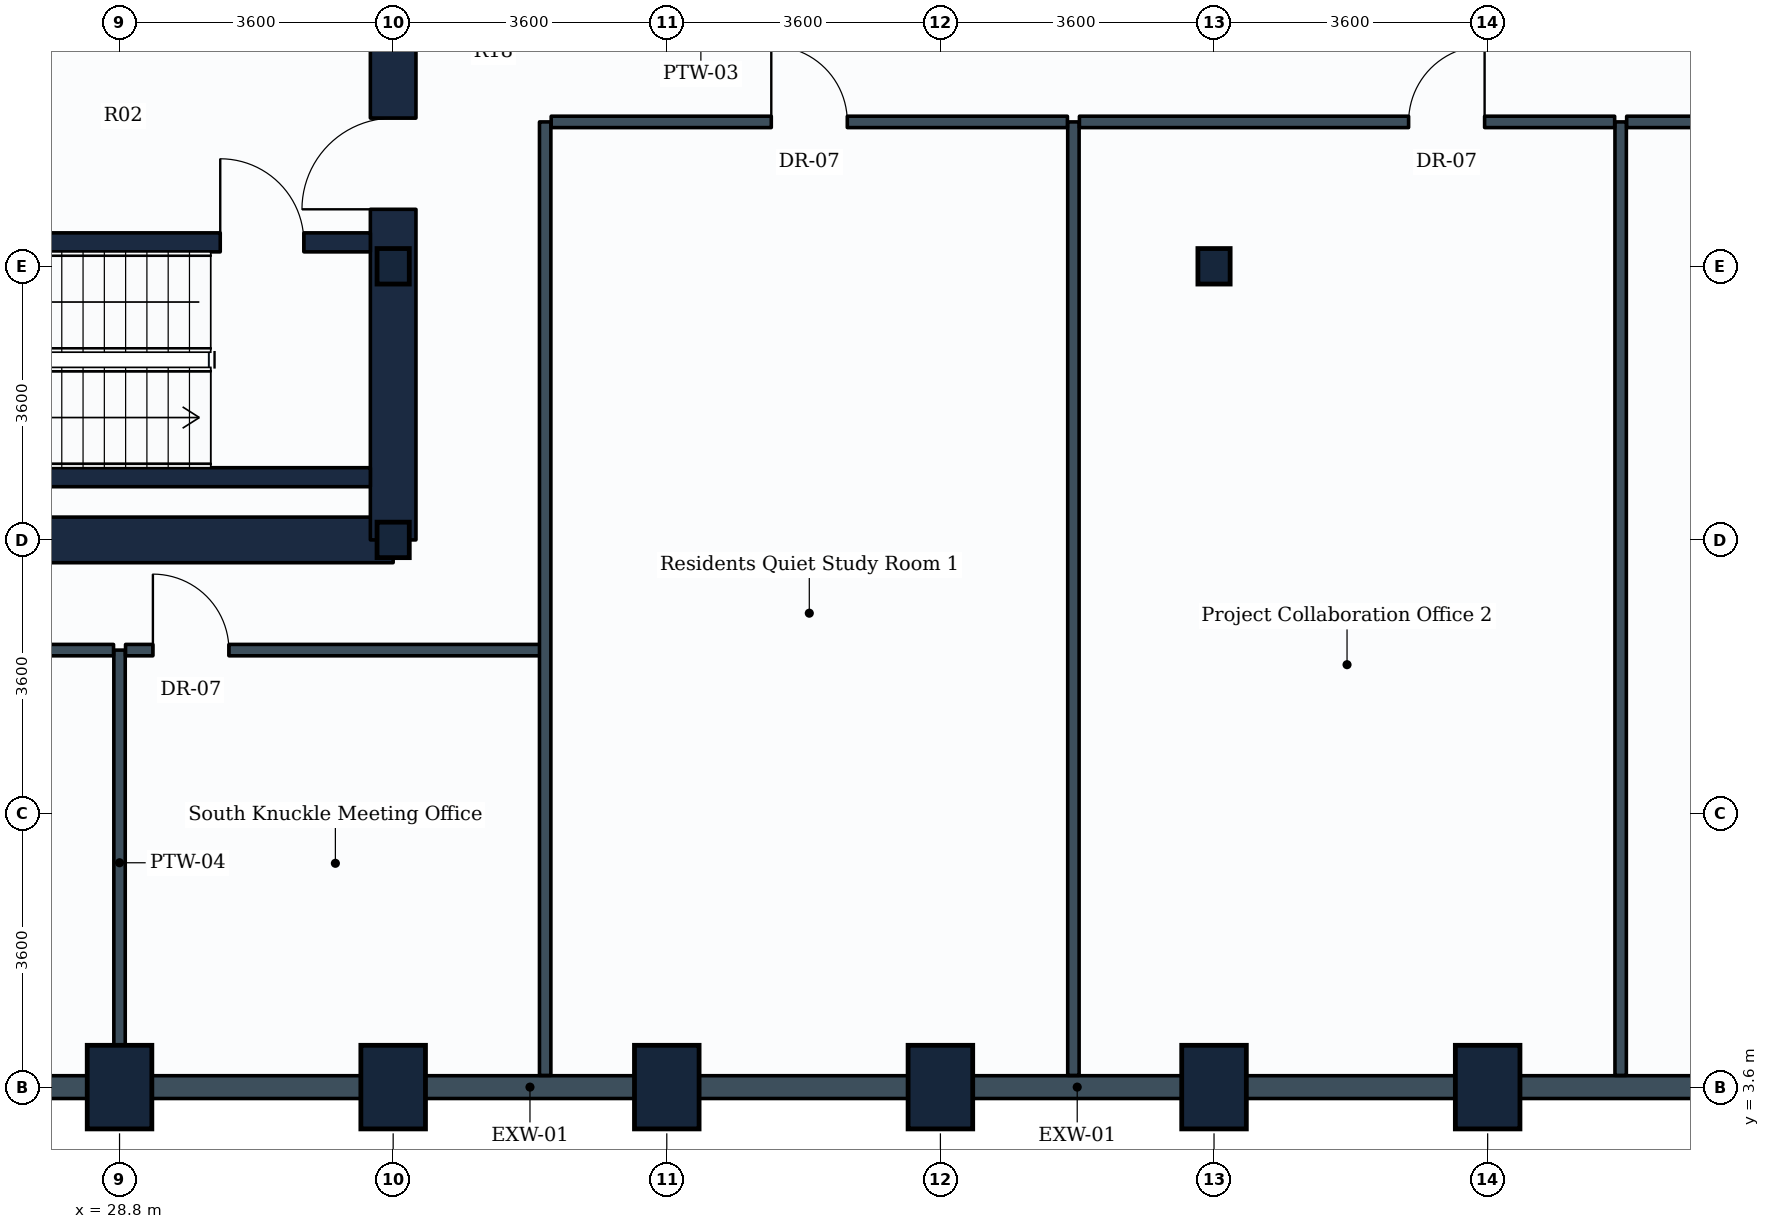
"""IFC4 building model, lengths in metres.
Left out: names, types, materials, properties, quantities, classifications, styles, units other than length and angle.
Written with IfcOpenShell. Run it as: python <this file> out.ifc"""

import sys

from ifc_helpers import new_model, si_unit, direction, frame, frame_2d, origin, origin_2d, place, context, subcontext, project, spatial, rectangle, i_section, extrude, element, fill, save


model = new_model("IFC4")
c1 = context("Model", 3, precision=1e-05, world=origin(), true_north=direction((0.0, 1.0)))
c2 = subcontext(c1, "Body", "Model", "MODEL_VIEW")
j1 = project(units=[si_unit("LENGTHUNIT", "METRE"), si_unit("PLANEANGLEUNIT", "RADIAN")], contexts=[c1])
p1 = place(None, origin())
s1 = spatial("IfcSite", under=j1, at=p1, CompositionType="ELEMENT")
p2 = place(p1, origin())
s2 = spatial("IfcBuilding", under=s1, at=p2, CompositionType="ELEMENT")
p3 = place(p2, frame((0.0, 0.0, 107.4)))
s3 = spatial("IfcBuildingStorey", under=s2, at=p3, CompositionType="ELEMENT", Elevation=107.4)
for number, where, z_axis, x_axis in (
    (1, (28.8, 3.6, 0.0), (0.0, 0.0, 1.0), (1.0, 0.0, 0.0)),
    (2, (32.4, 3.6, 0.0), (0.0, 0.0, 1.0), (1.0, 0.0, 0.0)),
):
    element("IfcColumn", number, at=place(p3, frame(where, z_axis=z_axis, x_axis=x_axis)), inside=s3, PredefinedType="COLUMN", context=c2, shape_type="SweptSolid", body=[
        extrude(rectangle(XDim=0.85, YDim=1.1, at=origin_2d()), origin(), (0.0, 0.0, 1.0), 3.9),
    ])
for number, where, z_axis, x_axis in (
    (3, (32.4, 10.8, 0.0), (0.0, 0.0, 1.0), (1.0, 0.0, 0.0)),
    (4, (32.4, 14.4, 0.0), (0.0, 0.0, 1.0), (1.0, 0.0, 0.0)),
):
    element("IfcColumn", number, at=place(p3, frame(where, z_axis=z_axis, x_axis=x_axis)), inside=s3, PredefinedType="COLUMN", context=c2, shape_type="SweptSolid", body=[
        extrude(i_section(OverallWidth=0.424, OverallDepth=0.467, WebThickness=0.033, FlangeThickness=0.053, FilletRadius=0.015, at=origin_2d()), origin(), (0.0, 0.0, 1.0), 3.9),
    ])
for number, where, z_axis, x_axis in (
    (5, (36.0, 3.6, 0.0), (0.0, 0.0, 1.0), (1.0, 0.0, 0.0)),
    (6, (39.6, 3.6, 0.0), (0.0, 0.0, 1.0), (1.0, 0.0, 0.0)),
    (7, (43.2, 3.6, 0.0), (0.0, 0.0, 1.0), (1.0, 0.0, 0.0)),
):
    element("IfcColumn", number, at=place(p3, frame(where, z_axis=z_axis, x_axis=x_axis)), inside=s3, PredefinedType="COLUMN", context=c2, shape_type="SweptSolid", body=[
        extrude(rectangle(XDim=0.85, YDim=1.1, at=origin_2d()), origin(), (0.0, 0.0, 1.0), 3.9),
    ])
p4 = place(p3, frame((43.2, 14.4, 0.0), z_axis=(0.0, 0.0, 1.0), x_axis=(1.0, 0.0, 0.0)))
e8 = element("IfcColumn", 8, at=p4, inside=s3, PredefinedType="COLUMN", context=c2, shape_type="SweptSolid", body=[
    extrude(i_section(OverallWidth=0.424, OverallDepth=0.467, WebThickness=0.033, FlangeThickness=0.053, FilletRadius=0.015, at=origin_2d()), origin(), (0.0, 0.0, 1.0), 3.9),
])
p5 = place(p3, frame((46.8, 3.6, 0.0), z_axis=(0.0, 0.0, 1.0), x_axis=(1.0, 0.0, 0.0)))
e9 = element("IfcColumn", 9, at=p5, inside=s3, PredefinedType="COLUMN", context=c2, shape_type="SweptSolid", body=[
    extrude(rectangle(XDim=0.85, YDim=1.1, at=origin_2d()), origin(), (0.0, 0.0, 1.0), 3.9),
])
p6 = place(p3, frame((28.8, 3.6, 0.0), z_axis=(0.0, 0.0, 1.0), x_axis=(-1.0, 0.0, 0.0)))
e10 = element("IfcWall", 10, at=p6, inside=s3, PredefinedType="STANDARD", context=c2, shape_type="SweptSolid", body=[
    extrude(rectangle(XDim=3.6, YDim=0.3, at=frame_2d((1.8, 0.0))), origin(), (0.0, 0.0, 1.0), 2.93),
])
p7 = place(p3, frame((32.4, 3.6, 0.0), z_axis=(0.0, 0.0, 1.0), x_axis=(-1.0, 0.0, 0.0)))
e11 = element("IfcWall", 11, at=p7, inside=s3, PredefinedType="STANDARD", context=c2, shape_type="SweptSolid", body=[
    extrude(rectangle(XDim=3.6, YDim=0.3, at=frame_2d((1.8, 0.0))), origin(), (0.0, 0.0, 1.0), 2.93),
])
for number, where, z_axis, x_axis in (
    (12, (36.0, 3.6, 0.0), (0.0, 0.0, 1.0), (-1.0, 0.0, 0.0)),
    (13, (39.6, 3.6, 0.0), (0.0, 0.0, 1.0), (-1.0, 0.0, 0.0)),
):
    element("IfcWall", number, at=place(p3, frame(where, z_axis=z_axis, x_axis=x_axis)), inside=s3, PredefinedType="STANDARD", context=c2, shape_type="SweptSolid", body=[
        extrude(rectangle(XDim=3.6, YDim=0.3, at=frame_2d((1.8, 0.0))), origin(), (0.0, 0.0, 1.0), 2.93),
    ])
p8 = place(p3, frame((43.2, 3.6, 0.0), z_axis=(0.0, 0.0, 1.0), x_axis=(-1.0, 0.0, 0.0)))
e14 = element("IfcWall", 14, at=p8, inside=s3, PredefinedType="STANDARD", context=c2, shape_type="SweptSolid", body=[
    extrude(rectangle(XDim=3.6, YDim=0.3, at=frame_2d((1.8, 0.0))), origin(), (0.0, 0.0, 1.0), 2.93),
])
p9 = place(p3, frame((46.8, 3.6, 0.0), z_axis=(0.0, 0.0, 1.0), x_axis=(-1.0, 0.0, 0.0)))
e15 = element("IfcWall", 15, at=p9, inside=s3, PredefinedType="STANDARD", context=c2, shape_type="SweptSolid", body=[
    extrude(rectangle(XDim=3.6, YDim=0.3, at=frame_2d((1.8, 0.0))), origin(), (0.0, 0.0, 1.0), 2.93),
])
p10 = place(p3, frame((50.4, 3.6, 0.0), z_axis=(0.0, 0.0, 1.0), x_axis=(-1.0, 0.0, 0.0)))
e16 = element("IfcWall", 16, at=p10, inside=s3, PredefinedType="STANDARD", context=c2, shape_type="SweptSolid", body=[
    extrude(rectangle(XDim=3.6, YDim=0.3, at=frame_2d((1.8, 0.0))), origin(), (0.0, 0.0, 1.0), 2.93),
])
p11 = place(p3, frame((14.4, 10.8, 0.0), z_axis=(0.0, 0.0, 1.0), x_axis=(1.0, 0.0, 0.0)))
e17 = element("IfcWall", 17, at=p11, inside=s3, PredefinedType="SHEAR", context=c2, shape_type="SweptSolid", body=[
    extrude(rectangle(XDim=18.0, YDim=0.6, at=frame_2d((9.0, 0.0))), origin(), (0.0, 0.0, 1.0), 3.65),
])
p12 = place(p3, frame((32.4, 10.8, 0.0), z_axis=(0.0, 0.0, 1.0), x_axis=(0.0, 1.0, 0.0)))
e18 = element("IfcWall", 18, at=p12, inside=s3, PredefinedType="SHEAR", context=c2, shape_type="SweptSolid", body=[
    extrude(rectangle(XDim=14.4, YDim=0.6, at=frame_2d((7.2, 0.0))), origin(), (0.0, 0.0, 1.0), 3.65),
])
p13 = place(p12, frame((4.35, 0.0, 0.0)))
e19 = element("IfcOpeningElement", 19, at=p13, cuts=e18, PredefinedType="OPENING", context=c2, shape_type="SweptSolid", body=[
    extrude(rectangle(XDim=1.2, YDim=2.1, at=frame_2d((0.6, 1.05))), frame((0.0, 0.31, 0.0), z_axis=(0.0, -1.0, 0.0), x_axis=(1.0, 0.0, 0.0)), (0.0, 0.0, 1.0), 0.62),
])
p14 = place(p12, frame((10.0, 0.0, 0.0)))
e20 = element("IfcOpeningElement", 20, at=p14, cuts=e18, PredefinedType="OPENING", context=c2, shape_type="SweptSolid", body=[
    extrude(rectangle(XDim=1.2, YDim=2.1, at=frame_2d((0.6, 1.05))), frame((0.0, 0.31, 0.0), z_axis=(0.0, -1.0, 0.0), x_axis=(1.0, 0.0, 0.0)), (0.0, 0.0, 1.0), 0.62),
])
p15 = place(p3, frame((23.35, 11.625, 0.0), z_axis=(0.0, 0.0, 1.0), x_axis=(1.0, 0.0, 0.0)))
e21 = element("IfcWall", 21, at=p15, inside=s3, PredefinedType="SHEAR", context=c2, shape_type="SweptSolid", body=[
    extrude(rectangle(XDim=8.75, YDim=0.25, at=frame_2d((4.375, 0.0))), origin(), (0.0, 0.0, 1.0), 3.65),
])
p16 = place(p3, frame((23.35, 14.715, 0.0), z_axis=(0.0, 0.0, 1.0), x_axis=(1.0, 0.0, 0.0)))
e22 = element("IfcWall", 22, at=p16, inside=s3, PredefinedType="SHEAR", context=c2, shape_type="SweptSolid", body=[
    extrude(rectangle(XDim=8.75, YDim=0.25, at=frame_2d((4.375, 0.0))), origin(), (0.0, 0.0, 1.0), 3.65),
])
p17 = place(p16, frame((6.775, 0.0, 0.0)))
e23 = element("IfcOpeningElement", 23, at=p17, cuts=e22, PredefinedType="OPENING", context=c2, shape_type="SweptSolid", body=[
    extrude(rectangle(XDim=1.1, YDim=2.1, at=frame_2d((0.55, 1.05))), frame((0.0, 0.135, 0.0), z_axis=(0.0, -1.0, 0.0), x_axis=(1.0, 0.0, 0.0)), (0.0, 0.0, 1.0), 0.27),
])
p18 = place(p3, frame((28.8, 9.35, 0.0), z_axis=(0.0, 0.0, 1.0), x_axis=(0.0, -1.0, 0.0)))
e24 = element("IfcWall", 24, at=p18, inside=s3, PredefinedType="PARTITIONING", context=c2, shape_type="SweptSolid", body=[
    extrude(rectangle(XDim=5.596, YDim=0.15, at=frame_2d((2.798, 0.0))), origin(), (0.0, 0.0, 1.0), 3.635),
])
p19 = place(p3, frame((13.08, 9.35, 0.0), z_axis=(0.0, 0.0, 1.0), x_axis=(1.0, 0.0, 0.0)))
e25 = element("IfcWall", 25, at=p19, inside=s3, PredefinedType="PARTITIONING", context=c2, shape_type="SweptSolid", body=[
    extrude(rectangle(XDim=15.641, YDim=0.15, at=frame_2d((7.82, 0.0))), origin(), (0.0, 0.0, 1.0), 3.18),
])
p20 = place(p3, frame((28.879, 9.35, 0.0), z_axis=(0.0, 0.0, 1.0), x_axis=(1.0, 0.0, 0.0)))
e26 = element("IfcWall", 26, at=p20, inside=s3, PredefinedType="PARTITIONING", context=c2, shape_type="SweptSolid", body=[
    extrude(rectangle(XDim=5.521, YDim=0.15, at=frame_2d((2.76, 0.0))), origin(), (0.0, 0.0, 1.0), 3.635),
])
p21 = place(p20, frame((0.36, 0.0, 0.0)))
e27 = element("IfcOpeningElement", 27, at=p21, cuts=e26, PredefinedType="OPENING", context=c2, shape_type="SweptSolid", body=[
    extrude(rectangle(XDim=1.0, YDim=2.1, at=frame_2d((0.5, 1.05))), frame((0.0, 0.085, 0.0), z_axis=(0.0, -1.0, 0.0), x_axis=(1.0, 0.0, 0.0)), (0.0, 0.0, 1.0), 0.17),
])
for number, where, z_axis, x_axis in (
    (28, (34.4, 3.754, 0.0), (0.0, 0.0, 1.0), (0.0, 1.0, 0.0)),
    (29, (41.35, 3.754, 0.0), (0.0, 0.0, 1.0), (0.0, 1.0, 0.0)),
):
    element("IfcWall", number, at=place(p3, frame(where, z_axis=z_axis, x_axis=x_axis)), inside=s3, PredefinedType="PARTITIONING", context=c2, shape_type="SweptSolid", body=[
        extrude(rectangle(XDim=12.546, YDim=0.15, at=frame_2d((6.273, 0.0))), origin(), (0.0, 0.0, 1.0), 2.93),
    ])
p22 = place(p3, frame((34.479, 16.3, 0.0), z_axis=(0.0, 0.0, 1.0), x_axis=(1.0, 0.0, 0.0)))
e30 = element("IfcWall", 30, at=p22, inside=s3, PredefinedType="PARTITIONING", context=c2, shape_type="SweptSolid", body=[
    extrude(rectangle(XDim=6.792, YDim=0.15, at=frame_2d((3.396, 0.0))), origin(), (0.0, 0.0, 1.0), 3.18),
])
p23 = place(p22, frame((2.896, 0.0, 0.0)))
e31 = element("IfcOpeningElement", 31, at=p23, cuts=e30, PredefinedType="OPENING", context=c2, shape_type="SweptSolid", body=[
    extrude(rectangle(XDim=1.0, YDim=2.1, at=frame_2d((0.5, 1.05))), frame((0.0, 0.085, 0.0), z_axis=(0.0, -1.0, 0.0), x_axis=(1.0, 0.0, 0.0)), (0.0, 0.0, 1.0), 0.17),
])
p24 = place(p3, frame((48.55, 3.754, 0.0), z_axis=(0.0, 0.0, 1.0), x_axis=(0.0, 1.0, 0.0)))
e32 = element("IfcWall", 32, at=p24, inside=s3, PredefinedType="PARTITIONING", context=c2, shape_type="SweptSolid", body=[
    extrude(rectangle(XDim=12.546, YDim=0.15, at=frame_2d((6.273, 0.0))), origin(), (0.0, 0.0, 1.0), 2.93),
])
p25 = place(p3, frame((41.429, 16.3, 0.0), z_axis=(0.0, 0.0, 1.0), x_axis=(1.0, 0.0, 0.0)))
e33 = element("IfcWall", 33, at=p25, inside=s3, PredefinedType="PARTITIONING", context=c2, shape_type="SweptSolid", body=[
    extrude(rectangle(XDim=7.042, YDim=0.15, at=frame_2d((3.521, 0.0))), origin(), (0.0, 0.0, 1.0), 3.19),
])
p26 = place(p25, frame((4.331, 0.0, 0.0)))
e34 = element("IfcOpeningElement", 34, at=p26, cuts=e33, PredefinedType="OPENING", context=c2, shape_type="SweptSolid", body=[
    extrude(rectangle(XDim=1.0, YDim=2.1, at=frame_2d((0.5, 1.05))), frame((0.0, 0.085, 0.0), z_axis=(0.0, -1.0, 0.0), x_axis=(1.0, 0.0, 0.0)), (0.0, 0.0, 1.0), 0.17),
])
p27 = place(p3, frame((48.629, 16.3, 0.0), z_axis=(0.0, 0.0, 1.0), x_axis=(1.0, 0.0, 0.0)))
e35 = element("IfcWall", 35, at=p27, inside=s3, PredefinedType="PARTITIONING", context=c2, shape_type="SweptSolid", body=[
    extrude(rectangle(XDim=8.817, YDim=0.15, at=frame_2d((4.409, 0.0))), origin(), (0.0, 0.0, 1.0), 2.93),
])
p28 = place(p27, frame((4.344, 0.0, 0.0)))
e36 = element("IfcOpeningElement", 36, at=p28, cuts=e35, PredefinedType="OPENING", context=c2, shape_type="SweptSolid", body=[
    extrude(rectangle(XDim=1.0, YDim=2.1, at=frame_2d((0.5, 1.05))), frame((0.0, 0.085, 0.0), z_axis=(0.0, -1.0, 0.0), x_axis=(1.0, 0.0, 0.0)), (0.0, 0.0, 1.0), 0.17),
])
p29 = place(p17, origin())
e37 = element("IfcDoor", 37, at=p29, inside=s3, OperationType="SINGLE_SWING_LEFT", PredefinedType="DOOR", context=c2, shape_type="SweptSolid", body=[
    extrude(rectangle(XDim=1.1, YDim=2.1, at=frame_2d((0.55, 1.05))), frame((0.0, 0.025, 0.0), z_axis=(0.0, -1.0, 0.0), x_axis=(1.0, 0.0, 0.0)), (0.0, 0.0, 1.0), 0.05),
])
fill(e23, e37)
p30 = place(p13, origin())
e38 = element("IfcDoor", 38, at=p30, inside=s3, OperationType="SINGLE_SWING_LEFT", PredefinedType="DOOR", context=c2, shape_type="SweptSolid", body=[
    extrude(rectangle(XDim=1.2, YDim=2.1, at=frame_2d((0.6, 1.05))), frame((0.0, 0.025, 0.0), z_axis=(0.0, -1.0, 0.0), x_axis=(1.0, 0.0, 0.0)), (0.0, 0.0, 1.0), 0.05),
])
fill(e19, e38)
p31 = place(p21, origin())
e39 = element("IfcDoor", 39, at=p31, inside=s3, OperationType="SINGLE_SWING_LEFT", PredefinedType="DOOR", context=c2, shape_type="SweptSolid", body=[
    extrude(rectangle(XDim=1.0, YDim=2.1, at=frame_2d((0.5, 1.05))), frame((0.0, 0.025, 0.0), z_axis=(0.0, -1.0, 0.0), x_axis=(1.0, 0.0, 0.0)), (0.0, 0.0, 1.0), 0.05),
])
fill(e27, e39)
p32 = place(p23, origin())
e40 = element("IfcDoor", 40, at=p32, inside=s3, OperationType="SINGLE_SWING_LEFT", PredefinedType="DOOR", context=c2, shape_type="SweptSolid", body=[
    extrude(rectangle(XDim=1.0, YDim=2.1, at=frame_2d((0.5, 1.05))), frame((0.0, 0.025, 0.0), z_axis=(0.0, -1.0, 0.0), x_axis=(1.0, 0.0, 0.0)), (0.0, 0.0, 1.0), 0.05),
])
fill(e31, e40)
p33 = place(p26, origin())
e41 = element("IfcDoor", 41, at=p33, inside=s3, OperationType="SINGLE_SWING_RIGHT", PredefinedType="DOOR", context=c2, shape_type="SweptSolid", body=[
    extrude(rectangle(XDim=1.0, YDim=2.1, at=frame_2d((0.5, 1.05))), frame((0.0, 0.025, 0.0), z_axis=(0.0, -1.0, 0.0), x_axis=(1.0, 0.0, 0.0)), (0.0, 0.0, 1.0), 0.05),
])
fill(e34, e41)
save(model, sys.argv[1])
